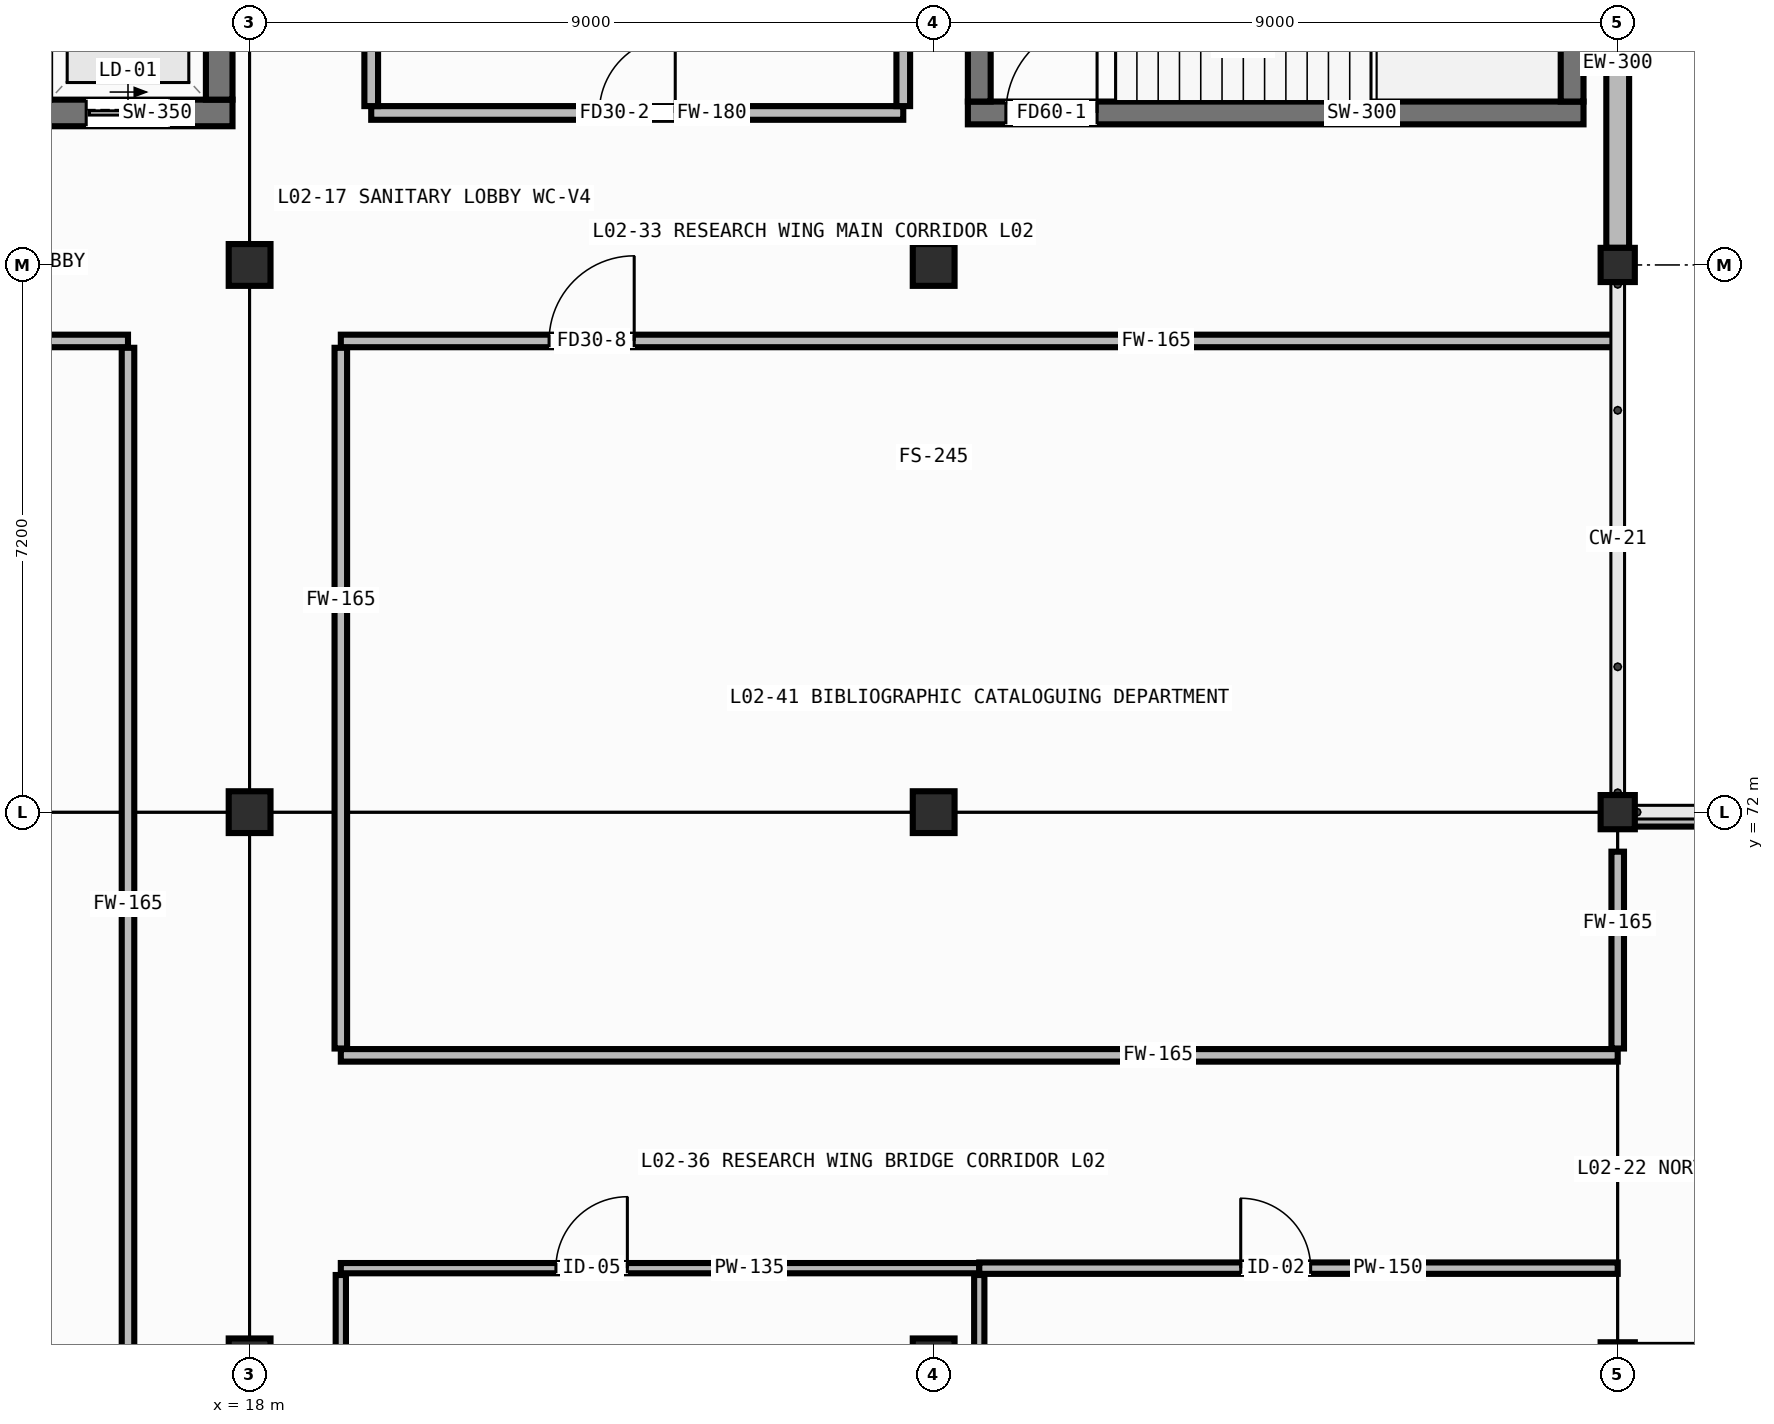
"""IFC4 building model, lengths in metres.
Left out: names, types, materials, properties, quantities, classifications, styles, units other than length and angle.
Written with IfcOpenShell. Run it as: python <this file> out.ifc"""

import sys

from ifc_helpers import new_model, si_unit, direction, frame, frame_2d, origin, origin_2d, place, context, subcontext, project, spatial, rectangle, hollow_rectangle, extrude, element, fill, save


model = new_model("IFC4")
c1 = context("Model", 3, precision=1e-05, world=origin(), true_north=direction((0.0, 1.0)))
c2 = subcontext(c1, "Body", "Model", "MODEL_VIEW")
j1 = project(units=[si_unit("LENGTHUNIT", "METRE"), si_unit("PLANEANGLEUNIT", "RADIAN")], contexts=[c1])
p1 = place(None, origin())
s1 = spatial("IfcSite", under=j1, at=p1, CompositionType="ELEMENT")
p2 = place(p1, origin())
s2 = spatial("IfcBuilding", under=s1, at=p2, CompositionType="ELEMENT")
p3 = place(p2, frame((0.0, 0.0, 4.8)))
s3 = spatial("IfcBuildingStorey", under=s2, at=p3, CompositionType="ELEMENT", Elevation=4.8)
for number, where, z_axis, x_axis in (
    (1, (18.0, 64.8, 0.0), (0.0, 0.0, 1.0), (1.0, 0.0, 0.0)),
    (2, (18.0, 72.0, 0.0), (0.0, 0.0, 1.0), (1.0, 0.0, 0.0)),
    (3, (18.0, 79.2, 0.0), (0.0, 0.0, 1.0), (1.0, 0.0, 0.0)),
    (4, (27.0, 64.8, 0.0), (0.0, 0.0, 1.0), (1.0, 0.0, 0.0)),
    (5, (27.0, 72.0, 0.0), (0.0, 0.0, 1.0), (1.0, 0.0, 0.0)),
    (6, (27.0, 79.2, 0.0), (0.0, 0.0, 1.0), (1.0, 0.0, 0.0)),
):
    element("IfcColumn", number, at=place(p3, frame(where, z_axis=z_axis, x_axis=x_axis)), inside=s3, PredefinedType="COLUMN", context=c2, shape_type="SweptSolid", body=[
        extrude(hollow_rectangle(XDim=0.55, YDim=0.55, WallThickness=0.022, at=origin_2d()), origin(), (0.0, 0.0, 1.0), 4.0),
    ])
for number, where, z_axis, x_axis in (
    (7, (36.0, 64.8, 0.0), (0.0, 0.0, 1.0), (1.0, 0.0, 0.0)),
    (8, (36.0, 72.0, 0.0), (0.0, 0.0, 1.0), (1.0, 0.0, 0.0)),
    (9, (36.0, 79.2, 0.0), (0.0, 0.0, 1.0), (1.0, 0.0, 0.0)),
):
    element("IfcColumn", number, at=place(p3, frame(where, z_axis=z_axis, x_axis=x_axis)), inside=s3, PredefinedType="COLUMN", context=c2, shape_type="SweptSolid", body=[
        extrude(hollow_rectangle(XDim=0.45, YDim=0.45, WallThickness=0.019, at=origin_2d()), origin(), (0.0, 0.0, 1.0), 4.0),
    ])
p4 = place(p3, frame((36.0, 86.175, 0.0), z_axis=(0.0, 0.0, 1.0), x_axis=(0.0, -1.0, 0.0)))
e10 = element("IfcWall", 10, at=p4, inside=s3, PredefinedType="STANDARD", context=c2, shape_type="SweptSolid", body=[
    extrude(rectangle(XDim=6.75, YDim=0.3, at=frame_2d((3.375, 0.0))), origin(), (0.0, 0.0, 1.0), 3.255),
])
p5 = place(p3, frame((36.0, 71.905, 4.0), z_axis=(0.0, 0.0, 1.0), x_axis=(1.0, 0.0, 0.0)))
e11 = element("IfcWall", 11, at=p5, inside=s3, PredefinedType="PARAPET", context=c2, shape_type="SweptSolid", body=[
    extrude(rectangle(XDim=9.0, YDim=0.19, at=frame_2d((4.5, 0.0))), origin(), (0.0, 0.0, 1.0), 0.65),
])
p6 = place(p3, frame((27.45, 81.2, 0.0), z_axis=(0.0, 0.0, 1.0), x_axis=(1.0, 0.0, 0.0)))
e12 = element("IfcWall", 12, at=p6, inside=s3, PredefinedType="SHEAR", context=c2, shape_type="SweptSolid", body=[
    extrude(rectangle(XDim=8.1, YDim=0.3, at=frame_2d((4.05, 0.0))), origin(), (0.0, 0.0, 1.0), 3.755),
])
p7 = place(p6, frame((0.5, 0.0, 0.0)))
e13 = element("IfcOpeningElement", 13, at=p7, cuts=e12, PredefinedType="OPENING", context=c2, shape_type="SweptSolid", body=[
    extrude(rectangle(XDim=1.2, YDim=2.1, at=frame_2d((0.6, 1.05))), frame((0.0, 0.162, 0.0), z_axis=(0.0, -1.0, 0.0), x_axis=(1.0, 0.0, 0.0)), (0.0, 0.0, 1.0), 0.324),
])
for number, where, z_axis, x_axis in (
    (14, (27.6, 81.35, 0.0), (0.0, 0.0, 1.0), (0.0, 1.0, 0.0)),
    (15, (35.4, 81.35, 0.0), (0.0, 0.0, 1.0), (0.0, 1.0, 0.0)),
):
    element("IfcWall", number, at=place(p3, frame(where, z_axis=z_axis, x_axis=x_axis)), inside=s3, PredefinedType="SHEAR", context=c2, shape_type="SweptSolid", body=[
        extrude(rectangle(XDim=3.8, YDim=0.3, at=frame_2d((1.9, 0.0))), origin(), (0.0, 0.0, 1.0), 3.755),
    ])
p8 = place(p3, frame((15.025, 81.2, 0.0), z_axis=(0.0, 0.0, 1.0), x_axis=(1.0, 0.0, 0.0)))
e16 = element("IfcWall", 16, at=p8, inside=s3, PredefinedType="SHEAR", context=c2, shape_type="SweptSolid", body=[
    extrude(rectangle(XDim=2.75, YDim=0.35, at=frame_2d((1.375, 0.0))), origin(), (0.0, 0.0, 1.0), 3.755),
])
p9 = place(p8, frame((0.825, 0.0, 0.0)))
e17 = element("IfcOpeningElement", 17, at=p9, cuts=e16, PredefinedType="OPENING", context=c2, shape_type="SweptSolid", body=[
    extrude(rectangle(XDim=1.1, YDim=2.1, at=frame_2d((0.55, 1.05))), frame((0.0, 0.187, 0.0), z_axis=(0.0, -1.0, 0.0), x_axis=(1.0, 0.0, 0.0)), (0.0, 0.0, 1.0), 0.374),
])
p10 = place(p3, frame((17.6, 81.375, 0.0), z_axis=(0.0, 0.0, 1.0), x_axis=(0.0, 1.0, 0.0)))
e18 = element("IfcWall", 18, at=p10, inside=s3, PredefinedType="SHEAR", context=c2, shape_type="SweptSolid", body=[
    extrude(rectangle(XDim=2.25, YDim=0.35, at=frame_2d((1.125, 0.0))), origin(), (0.0, 0.0, 1.0), 3.755),
])
p11 = place(p3, frame((19.6, 81.2, 0.0), z_axis=(0.0, 0.0, 1.0), x_axis=(1.0, 0.0, 0.0)))
e19 = element("IfcWall", 19, at=p11, inside=s3, PredefinedType="PARTITIONING", context=c2, shape_type="SweptSolid", body=[
    extrude(rectangle(XDim=7.0, YDim=0.18, at=frame_2d((3.5, 0.0))), origin(), (0.0, 0.0, 1.0), 3.755),
])
p12 = place(p11, frame((3.0, 0.0, 0.0)))
e20 = element("IfcOpeningElement", 20, at=p12, cuts=e19, PredefinedType="OPENING", context=c2, shape_type="SweptSolid", body=[
    extrude(rectangle(XDim=1.0, YDim=2.08, at=frame_2d((0.5, 1.04))), frame((0.0, 0.102, 0.0), z_axis=(0.0, -1.0, 0.0), x_axis=(1.0, 0.0, 0.0)), (0.0, 0.0, 1.0), 0.204),
])
for number, where, z_axis, x_axis in (
    (21, (19.6, 81.29, 0.0), (0.0, 0.0, 1.0), (0.0, 1.0, 0.0)),
    (22, (26.6, 81.29, 0.0), (0.0, 0.0, 1.0), (0.0, 1.0, 0.0)),
):
    element("IfcWall", number, at=place(p3, frame(where, z_axis=z_axis, x_axis=x_axis)), inside=s3, PredefinedType="PARTITIONING", context=c2, shape_type="SweptSolid", body=[
        extrude(rectangle(XDim=2.22, YDim=0.18, at=frame_2d((1.11, 0.0))), origin(), (0.0, 0.0, 1.0), 3.755),
    ])
p13 = place(p3, frame((0.035, 78.2, 0.0), z_axis=(0.0, 0.0, 1.0), x_axis=(1.0, 0.0, 0.0)))
e23 = element("IfcWall", 23, at=p13, inside=s3, PredefinedType="PARTITIONING", context=c2, shape_type="SweptSolid", body=[
    extrude(rectangle(XDim=16.365, YDim=0.165, at=frame_2d((8.183, 0.0))), origin(), (0.0, 0.0, 1.0), 3.755),
])
p14 = place(p13, frame((3.94, 0.0, 0.0)))
e24 = element("IfcOpeningElement", 24, at=p14, cuts=e23, PredefinedType="OPENING", context=c2, shape_type="SweptSolid", body=[
    extrude(rectangle(XDim=1.05, YDim=2.1, at=frame_2d((0.525, 1.05))), frame((0.0, 0.094, 0.0), z_axis=(0.0, -1.0, 0.0), x_axis=(1.0, 0.0, 0.0)), (0.0, 0.0, 1.0), 0.189),
])
p15 = place(p3, frame((16.4, 57.765, 0.0), z_axis=(0.0, 0.0, 1.0), x_axis=(0.0, 1.0, 0.0)))
e25 = element("IfcWall", 25, at=p15, inside=s3, PredefinedType="PARTITIONING", context=c2, shape_type="SweptSolid", body=[
    extrude(rectangle(XDim=20.345, YDim=0.165, at=frame_2d((10.173, 0.0))), origin(), (0.0, 0.0, 1.0), 3.755),
])
p16 = place(p3, frame((19.2, 66.0, 0.0), z_axis=(0.0, 0.0, 1.0), x_axis=(1.0, 0.0, 0.0)))
e26 = element("IfcWall", 26, at=p16, inside=s3, PredefinedType="PARTITIONING", context=c2, shape_type="SweptSolid", body=[
    extrude(rectangle(XDim=8.4, YDim=0.135, at=frame_2d((4.2, 0.0))), origin(), (0.0, 0.0, 1.0), 3.755),
])
p17 = place(p16, frame((2.83, 0.0, 0.0)))
e27 = element("IfcOpeningElement", 27, at=p17, cuts=e26, PredefinedType="OPENING", context=c2, shape_type="SweptSolid", body=[
    extrude(rectangle(XDim=0.94, YDim=2.06, at=frame_2d((0.47, 1.03))), frame((0.0, 0.08, 0.0), z_axis=(0.0, -1.0, 0.0), x_axis=(1.0, 0.0, 0.0)), (0.0, 0.0, 1.0), 0.159),
])
p18 = place(p3, frame((19.2, 57.635, 0.0), z_axis=(0.0, 0.0, 1.0), x_axis=(0.0, 1.0, 0.0)))
e28 = element("IfcWall", 28, at=p18, inside=s3, PredefinedType="PARTITIONING", context=c2, shape_type="SweptSolid", body=[
    extrude(rectangle(XDim=8.275, YDim=0.135, at=frame_2d((4.137, 0.0))), origin(), (0.0, 0.0, 1.0), 3.755),
])
p19 = place(p3, frame((27.6, 57.765, 0.0), z_axis=(0.0, 0.0, 1.0), x_axis=(0.0, 1.0, 0.0)))
e29 = element("IfcWall", 29, at=p19, inside=s3, PredefinedType="PARTITIONING", context=c2, shape_type="SweptSolid", body=[
    extrude(rectangle(XDim=8.145, YDim=0.135, at=frame_2d((4.073, 0.0))), origin(), (0.0, 0.0, 1.0), 3.755),
])
p20 = place(p3, frame((27.6, 66.0, 0.0), z_axis=(0.0, 0.0, 1.0), x_axis=(1.0, 0.0, 0.0)))
e30 = element("IfcWall", 30, at=p20, inside=s3, PredefinedType="PARTITIONING", context=c2, shape_type="SweptSolid", body=[
    extrude(rectangle(XDim=8.4, YDim=0.15, at=frame_2d((4.2, 0.0))), origin(), (0.0, 0.0, 1.0), 3.755),
])
p21 = place(p20, frame((3.44, 0.0, 0.0)))
e31 = element("IfcOpeningElement", 31, at=p21, cuts=e30, PredefinedType="OPENING", context=c2, shape_type="SweptSolid", body=[
    extrude(rectangle(XDim=0.92, YDim=2.06, at=frame_2d((0.46, 1.03))), frame((0.0, 0.087, 0.0), z_axis=(0.0, -1.0, 0.0), x_axis=(1.0, 0.0, 0.0)), (0.0, 0.0, 1.0), 0.174),
])
p22 = place(p3, frame((19.2, 68.8, 0.0), z_axis=(0.0, 0.0, 1.0), x_axis=(1.0, 0.0, 0.0)))
e32 = element("IfcWall", 32, at=p22, inside=s3, PredefinedType="PARTITIONING", context=c2, shape_type="SweptSolid", body=[
    extrude(rectangle(XDim=16.8, YDim=0.165, at=frame_2d((8.4, 0.0))), origin(), (0.0, 0.0, 1.0), 3.755),
])
p23 = place(p3, frame((19.2, 78.2, 0.0), z_axis=(0.0, 0.0, 1.0), x_axis=(1.0, 0.0, 0.0)))
e33 = element("IfcWall", 33, at=p23, inside=s3, PredefinedType="PARTITIONING", context=c2, shape_type="SweptSolid", body=[
    extrude(rectangle(XDim=16.765, YDim=0.165, at=frame_2d((8.383, 0.0))), origin(), (0.0, 0.0, 1.0), 3.755),
])
p24 = place(p23, frame((2.74, 0.0, 0.0)))
e34 = element("IfcOpeningElement", 34, at=p24, cuts=e33, PredefinedType="OPENING", context=c2, shape_type="SweptSolid", body=[
    extrude(rectangle(XDim=1.12, YDim=2.08, at=frame_2d((0.56, 1.04))), frame((0.0, 0.094, 0.0), z_axis=(0.0, -1.0, 0.0), x_axis=(1.0, 0.0, 0.0)), (0.0, 0.0, 1.0), 0.189),
])
p25 = place(p3, frame((19.2, 68.89, 0.0), z_axis=(0.0, 0.0, 1.0), x_axis=(0.0, 1.0, 0.0)))
e35 = element("IfcWall", 35, at=p25, inside=s3, PredefinedType="PARTITIONING", context=c2, shape_type="SweptSolid", body=[
    extrude(rectangle(XDim=9.22, YDim=0.165, at=frame_2d((4.61, 0.0))), origin(), (0.0, 0.0, 1.0), 3.755),
])
p26 = place(p3, frame((36.0, 68.89, 0.0), z_axis=(0.0, 0.0, 1.0), x_axis=(0.0, 1.0, 0.0)))
e36 = element("IfcWall", 36, at=p26, inside=s3, PredefinedType="PARTITIONING", context=c2, shape_type="SweptSolid", body=[
    extrude(rectangle(XDim=2.59, YDim=0.165, at=frame_2d((1.295, 0.0))), origin(), (0.0, 0.0, 1.0), 3.035),
])
p27 = place(p7, origin())
e37 = element("IfcDoor", 37, at=p27, inside=s3, OperationType="SINGLE_SWING_RIGHT", PredefinedType="DOOR", context=c2, shape_type="SweptSolid", body=[
    extrude(rectangle(XDim=1.2, YDim=2.1, at=frame_2d((0.6, 1.05))), frame((0.0, 0.025, 0.0), z_axis=(0.0, -1.0, 0.0), x_axis=(1.0, 0.0, 0.0)), (0.0, 0.0, 1.0), 0.05),
])
fill(e13, e37)
p28 = place(p9, origin())
e38 = element("IfcDoor", 38, at=p28, inside=s3, OperationType="SLIDING_TO_LEFT", PredefinedType="DOOR", context=c2, shape_type="SweptSolid", body=[
    extrude(rectangle(XDim=1.1, YDim=2.1, at=frame_2d((0.55, 1.05))), frame((0.0, 0.025, 0.0), z_axis=(0.0, -1.0, 0.0), x_axis=(1.0, 0.0, 0.0)), (0.0, 0.0, 1.0), 0.05),
])
fill(e17, e38)
p29 = place(p12, origin())
e39 = element("IfcDoor", 39, at=p29, inside=s3, OperationType="SINGLE_SWING_RIGHT", PredefinedType="DOOR", context=c2, shape_type="SweptSolid", body=[
    extrude(rectangle(XDim=1.0, YDim=2.08, at=frame_2d((0.5, 1.04))), frame((0.0, 0.025, 0.0), z_axis=(0.0, -1.0, 0.0), x_axis=(1.0, 0.0, 0.0)), (0.0, 0.0, 1.0), 0.05),
])
fill(e20, e39)
p30 = place(p17, origin())
e40 = element("IfcDoor", 40, at=p30, inside=s3, OperationType="SINGLE_SWING_RIGHT", PredefinedType="DOOR", context=c2, shape_type="SweptSolid", body=[
    extrude(rectangle(XDim=0.94, YDim=2.06, at=frame_2d((0.47, 1.03))), frame((0.0, 0.025, 0.0), z_axis=(0.0, -1.0, 0.0), x_axis=(1.0, 0.0, 0.0)), (0.0, 0.0, 1.0), 0.05),
])
fill(e27, e40)
p31 = place(p21, origin())
e41 = element("IfcDoor", 41, at=p31, inside=s3, OperationType="SINGLE_SWING_LEFT", PredefinedType="DOOR", context=c2, shape_type="SweptSolid", body=[
    extrude(rectangle(XDim=0.92, YDim=2.06, at=frame_2d((0.46, 1.03))), frame((0.0, 0.025, 0.0), z_axis=(0.0, -1.0, 0.0), x_axis=(1.0, 0.0, 0.0)), (0.0, 0.0, 1.0), 0.05),
])
fill(e31, e41)
p32 = place(p24, origin())
e42 = element("IfcDoor", 42, at=p32, inside=s3, OperationType="SINGLE_SWING_RIGHT", PredefinedType="DOOR", context=c2, shape_type="SweptSolid", body=[
    extrude(rectangle(XDim=1.12, YDim=2.08, at=frame_2d((0.56, 1.04))), frame((0.0, 0.025, 0.0), z_axis=(0.0, -1.0, 0.0), x_axis=(1.0, 0.0, 0.0)), (0.0, 0.0, 1.0), 0.05),
])
fill(e34, e42)
save(model, sys.argv[1])
